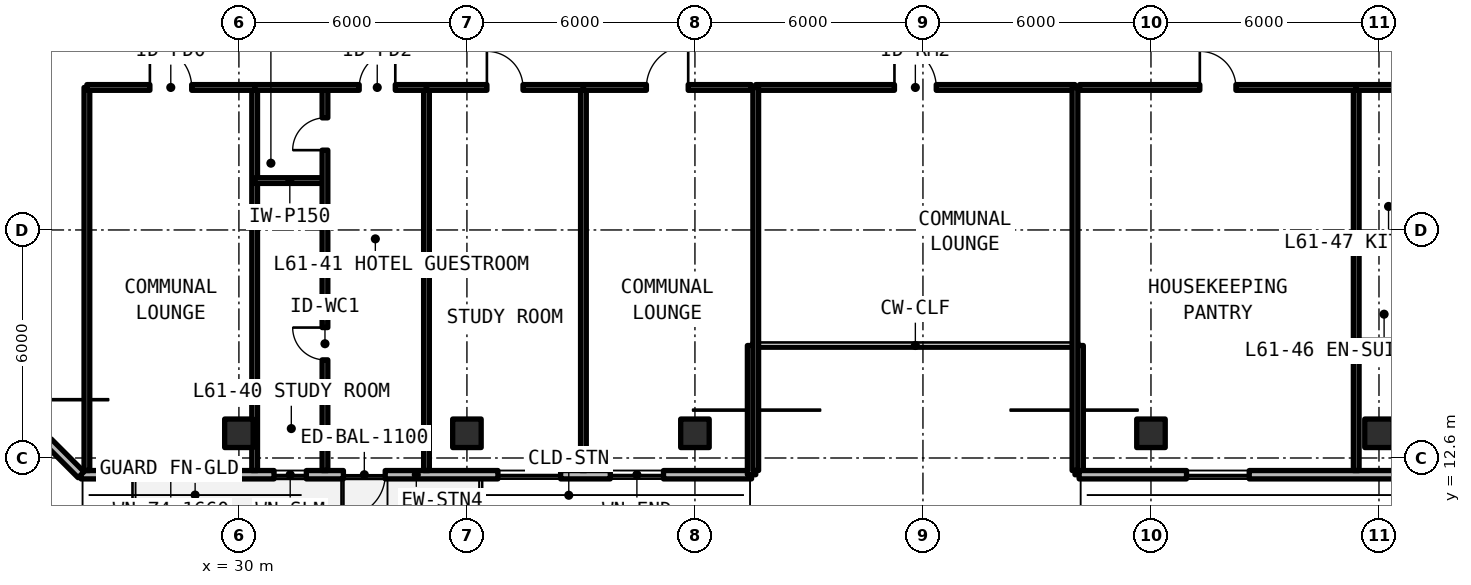
"""IFC4 building model, lengths in metres.
Left out: names, types, materials, properties, quantities, classifications, styles, units other than length and angle.
Written with IfcOpenShell. Run it as: python <this file> out.ifc"""

import sys

from ifc_helpers import new_model, si_unit, direction, frame, frame_2d, origin, origin_2d, place, context, subcontext, project, spatial, rectangle, extrude, element, fill, save


model = new_model("IFC4")
c1 = context("Model", 3, precision=1e-05, world=origin(), true_north=direction((0.0, 1.0)))
c2 = subcontext(c1, "Body", "Model", "MODEL_VIEW")
j1 = project(units=[si_unit("LENGTHUNIT", "METRE"), si_unit("PLANEANGLEUNIT", "RADIAN")], contexts=[c1])
p1 = place(None, origin())
s1 = spatial("IfcSite", under=j1, at=p1, CompositionType="ELEMENT")
p2 = place(p1, origin())
s2 = spatial("IfcBuilding", under=s1, at=p2, CompositionType="ELEMENT")
p3 = place(p2, frame((0.0, 0.0, 219.12)))
s3 = spatial("IfcBuildingStorey", under=s2, at=p3, CompositionType="ELEMENT", Elevation=219.12)
for number, where, z_axis, x_axis in (
    (1, (30.0, 13.25, 0.0), (0.0, 0.0, 1.0), (1.0, 0.0, 0.0)),
    (2, (36.0, 13.25, 0.0), (0.0, 0.0, 1.0), (1.0, 0.0, 0.0)),
    (3, (42.0, 13.25, 0.0), (0.0, 0.0, 1.0), (1.0, 0.0, 0.0)),
    (4, (54.0, 13.25, 0.0), (0.0, 0.0, 1.0), (1.0, 0.0, 0.0)),
    (5, (60.0, 13.25, 0.0), (0.0, 0.0, 1.0), (1.0, 0.0, 0.0)),
):
    element("IfcColumn", number, at=place(p3, frame(where, z_axis=z_axis, x_axis=x_axis)), inside=s3, PredefinedType="COLUMN", context=c2, shape_type="SweptSolid", body=[
        extrude(rectangle(XDim=0.75, YDim=0.75, at=origin_2d()), origin(), (0.0, 0.0, 1.0), 3.63),
    ])
p4 = place(p3, frame((25.846, 12.16, 0.0), z_axis=(0.0, 0.0, 1.0), x_axis=(1.0, 0.0, 0.0)))
e6 = element("IfcWall", 6, at=p4, inside=s3, PredefinedType="SOLIDWALL", context=c2, shape_type="SweptSolid", body=[
    extrude(rectangle(XDim=17.644, YDim=0.22, at=frame_2d((8.822, 0.0))), origin(), (0.0, 0.0, 1.0), 3.41),
])
p5 = place(p4, frame((6.904, 0.0, 0.0)))
e7 = element("IfcOpeningElement", 7, at=p5, cuts=e6, PredefinedType="OPENING", context=c2, shape_type="SweptSolid", body=[
    extrude(rectangle(XDim=1.1, YDim=2.15, at=frame_2d((0.55, 1.075))), frame((0.0, 0.12, 0.0), z_axis=(0.0, -1.0, 0.0), x_axis=(1.0, 0.0, 0.0)), (0.0, 0.0, 1.0), 0.24),
])
p6 = place(p4, frame((1.537, 0.0, 0.78)))
e8 = element("IfcOpeningElement", 8, at=p6, cuts=e6, PredefinedType="OPENING", context=c2, shape_type="SweptSolid", body=[
    extrude(rectangle(XDim=1.65, YDim=1.66, at=frame_2d((0.825, 0.83))), frame((0.0, 0.12, 0.0), z_axis=(0.0, -1.0, 0.0), x_axis=(1.0, 0.0, 0.0)), (0.0, 0.0, 1.0), 0.24),
])
p7 = place(p4, frame((5.079, 0.0, 0.78)))
e9 = element("IfcOpeningElement", 9, at=p7, cuts=e6, PredefinedType="OPENING", context=c2, shape_type="SweptSolid", body=[
    extrude(rectangle(XDim=0.85, YDim=1.65, at=frame_2d((0.425, 0.825))), frame((0.0, 0.12, 0.0), z_axis=(0.0, -1.0, 0.0), x_axis=(1.0, 0.0, 0.0)), (0.0, 0.0, 1.0), 0.24),
])
p8 = place(p4, frame((10.97, 0.0, 0.78)))
e10 = element("IfcOpeningElement", 10, at=p8, cuts=e6, PredefinedType="OPENING", context=c2, shape_type="SweptSolid", body=[
    extrude(rectangle(XDim=1.65, YDim=1.66, at=frame_2d((0.825, 0.83))), frame((0.0, 0.12, 0.0), z_axis=(0.0, -1.0, 0.0), x_axis=(1.0, 0.0, 0.0)), (0.0, 0.0, 1.0), 0.24),
])
p9 = place(p4, frame((13.927, 0.0, 0.78)))
e11 = element("IfcOpeningElement", 11, at=p9, cuts=e6, PredefinedType="OPENING", context=c2, shape_type="SweptSolid", body=[
    extrude(rectangle(XDim=1.4, YDim=1.65, at=frame_2d((0.7, 0.825))), frame((0.0, 0.12, 0.0), z_axis=(0.0, -1.0, 0.0), x_axis=(1.0, 0.0, 0.0)), (0.0, 0.0, 1.0), 0.24),
])
for number, where, z_axis, x_axis in (
    (12, (43.49, 12.16, 0.0), (0.0, 0.0, 1.0), (0.0, 1.0, 0.0)),
    (13, (52.11, 15.56, 0.0), (0.0, 0.0, 1.0), (0.0, -1.0, 0.0)),
):
    element("IfcWall", number, at=place(p3, frame(where, z_axis=z_axis, x_axis=x_axis)), inside=s3, PredefinedType="SOLIDWALL", context=c2, shape_type="SweptSolid", body=[
        extrude(rectangle(XDim=3.4, YDim=0.22, at=frame_2d((1.7, 0.0))), origin(), (0.0, 0.0, 1.0), 3.41),
    ])
p10 = place(p3, frame((52.11, 12.16, 0.0), z_axis=(0.0, 0.0, 1.0), x_axis=(1.0, 0.0, 0.0)))
e14 = element("IfcWall", 14, at=p10, inside=s3, PredefinedType="SOLIDWALL", context=c2, shape_type="SweptSolid", body=[
    extrude(rectangle(XDim=43.244, YDim=0.22, at=frame_2d((21.622, 0.0))), origin(), (0.0, 0.0, 1.0), 3.41),
])
p11 = place(p10, frame((16.69, 0.0, 0.0)))
e15 = element("IfcOpeningElement", 15, at=p11, cuts=e14, PredefinedType="OPENING", context=c2, shape_type="SweptSolid", body=[
    extrude(rectangle(XDim=1.1, YDim=2.15, at=frame_2d((0.55, 1.075))), frame((0.0, 0.12, 0.0), z_axis=(0.0, -1.0, 0.0), x_axis=(1.0, 0.0, 0.0)), (0.0, 0.0, 1.0), 0.24),
])
p12 = place(p10, frame((27.79, 0.0, 0.0)))
e16 = element("IfcOpeningElement", 16, at=p12, cuts=e14, PredefinedType="OPENING", context=c2, shape_type="SweptSolid", body=[
    extrude(rectangle(XDim=1.1, YDim=2.15, at=frame_2d((0.55, 1.075))), frame((0.0, 0.12, 0.0), z_axis=(0.0, -1.0, 0.0), x_axis=(1.0, 0.0, 0.0)), (0.0, 0.0, 1.0), 0.24),
])
p13 = place(p10, frame((2.826, 0.0, 0.78)))
e17 = element("IfcOpeningElement", 17, at=p13, cuts=e14, PredefinedType="OPENING", context=c2, shape_type="SweptSolid", body=[
    extrude(rectangle(XDim=1.65, YDim=1.66, at=frame_2d((0.825, 0.83))), frame((0.0, 0.12, 0.0), z_axis=(0.0, -1.0, 0.0), x_axis=(1.0, 0.0, 0.0)), (0.0, 0.0, 1.0), 0.24),
])
p14 = place(p10, frame((10.865, 0.0, 0.78)))
e18 = element("IfcOpeningElement", 18, at=p14, cuts=e14, PredefinedType="OPENING", context=c2, shape_type="SweptSolid", body=[
    extrude(rectangle(XDim=1.65, YDim=1.66, at=frame_2d((0.825, 0.83))), frame((0.0, 0.12, 0.0), z_axis=(0.0, -1.0, 0.0), x_axis=(1.0, 0.0, 0.0)), (0.0, 0.0, 1.0), 0.24),
])
p15 = place(p10, frame((38.666, 0.0, 0.78)))
e19 = element("IfcOpeningElement", 19, at=p15, cuts=e14, PredefinedType="OPENING", context=c2, shape_type="SweptSolid", body=[
    extrude(rectangle(XDim=1.65, YDim=1.66, at=frame_2d((0.825, 0.83))), frame((0.0, 0.12, 0.0), z_axis=(0.0, -1.0, 0.0), x_axis=(1.0, 0.0, 0.0)), (0.0, 0.0, 1.0), 0.24),
])
p16 = place(p3, frame((21.71, 16.296, 0.0), z_axis=(0.0, 0.0, 1.0), x_axis=(0.707106781187, -0.707106781187, 0.0)))
e20 = element("IfcWall", 20, at=p16, inside=s3, PredefinedType="SOLIDWALL", context=c2, shape_type="SweptSolid", body=[
    extrude(rectangle(XDim=5.849, YDim=0.22, at=frame_2d((2.924, 0.0))), origin(), (0.0, 0.0, 1.0), 3.41),
])
p17 = place(p16, frame((1.224, 0.0, 0.78)))
e21 = element("IfcOpeningElement", 21, at=p17, cuts=e20, PredefinedType="OPENING", context=c2, shape_type="SweptSolid", body=[
    extrude(rectangle(XDim=3.4, YDim=1.66, at=frame_2d((1.7, 0.83))), frame((0.0, 0.12, 0.0), z_axis=(0.0, -1.0, 0.0), x_axis=(1.0, 0.0, 0.0)), (0.0, 0.0, 1.0), 0.24),
])
p18 = place(p3, frame((43.6, 22.35, 0.0), z_axis=(0.0, 0.0, 1.0), x_axis=(1.0, 0.0, 0.0)))
e22 = element("IfcWall", 22, at=p18, inside=s3, PredefinedType="SOLIDWALL", context=c2, shape_type="SweptSolid", body=[
    extrude(rectangle(XDim=8.4, YDim=0.15, at=frame_2d((4.2, 0.0))), origin(), (0.0, 0.0, 1.0), 2.63),
])
p19 = place(p18, frame((3.65, 0.0, 0.0)))
e23 = element("IfcOpeningElement", 23, at=p19, cuts=e22, PredefinedType="OPENING", context=c2, shape_type="SweptSolid", body=[
    extrude(rectangle(XDim=1.1, YDim=2.15, at=frame_2d((0.55, 1.075))), frame((0.0, 0.085, 0.0), z_axis=(0.0, -1.0, 0.0), x_axis=(1.0, 0.0, 0.0)), (0.0, 0.0, 1.0), 0.17),
])
for number, where, z_axis, x_axis in (
    (24, (43.6, 12.27, 0.0), (0.0, 0.0, 1.0), (0.0, 1.0, 0.0)),
    (25, (52.0, 12.27, 0.0), (0.0, 0.0, 1.0), (0.0, 1.0, 0.0)),
    (26, (26.0, 12.27, 0.0), (0.0, 0.0, 1.0), (0.0, 1.0, 0.0)),
    (27, (30.415, 12.27, 0.0), (0.0, 0.0, 1.0), (0.0, 1.0, 0.0)),
):
    element("IfcWall", number, at=place(p3, frame(where, z_axis=z_axis, x_axis=x_axis)), inside=s3, PredefinedType="SOLIDWALL", context=c2, shape_type="SweptSolid", body=[
        extrude(rectangle(XDim=10.08, YDim=0.15, at=frame_2d((5.04, 0.0))), origin(), (0.0, 0.0, 1.0), 2.63),
    ])
p20 = place(p3, frame((26.0, 22.35, 0.0), z_axis=(0.0, 0.0, 1.0), x_axis=(1.0, 0.0, 0.0)))
e28 = element("IfcWall", 28, at=p20, inside=s3, PredefinedType="SOLIDWALL", context=c2, shape_type="SweptSolid", body=[
    extrude(rectangle(XDim=4.415, YDim=0.15, at=frame_2d((2.207, 0.0))), origin(), (0.0, 0.0, 1.0), 2.63),
])
p21 = place(p20, frame((1.657, 0.0, 0.0)))
e29 = element("IfcOpeningElement", 29, at=p21, cuts=e28, PredefinedType="OPENING", context=c2, shape_type="SweptSolid", body=[
    extrude(rectangle(XDim=1.1, YDim=2.15, at=frame_2d((0.55, 1.075))), frame((0.0, 0.085, 0.0), z_axis=(0.0, -1.0, 0.0), x_axis=(1.0, 0.0, 0.0)), (0.0, 0.0, 1.0), 0.17),
])
p22 = place(p3, frame((34.936, 12.27, 0.0), z_axis=(0.0, 0.0, 1.0), x_axis=(0.0, 1.0, 0.0)))
e30 = element("IfcWall", 30, at=p22, inside=s3, PredefinedType="SOLIDWALL", context=c2, shape_type="SweptSolid", body=[
    extrude(rectangle(XDim=10.08, YDim=0.15, at=frame_2d((5.04, 0.0))), origin(), (0.0, 0.0, 1.0), 2.63),
])
p23 = place(p3, frame((30.415, 19.9, 0.0), z_axis=(0.0, 0.0, 1.0), x_axis=(1.0, 0.0, 0.0)))
e31 = element("IfcWall", 31, at=p23, inside=s3, PredefinedType="PARTITIONING", context=c2, shape_type="SweptSolid", body=[
    extrude(rectangle(XDim=1.85, YDim=0.15, at=frame_2d((0.925, 0.0))), origin(), (0.0, 0.0, 1.0), 2.63),
])
p24 = place(p3, frame((32.264, 12.27, 0.0), z_axis=(0.0, 0.0, 1.0), x_axis=(0.0, 1.0, 0.0)))
e32 = element("IfcWall", 32, at=p24, inside=s3, PredefinedType="PARTITIONING", context=c2, shape_type="SweptSolid", body=[
    extrude(rectangle(XDim=10.08, YDim=0.15, at=frame_2d((5.04, 0.0))), origin(), (0.0, 0.0, 1.0), 2.63),
])
p25 = place(p24, frame((2.912, 0.0, 0.0)))
e33 = element("IfcOpeningElement", 33, at=p25, cuts=e32, PredefinedType="OPENING", context=c2, shape_type="SweptSolid", body=[
    extrude(rectangle(XDim=0.85, YDim=2.1, at=frame_2d((0.425, 1.05))), frame((0.0, 0.085, 0.0), z_axis=(0.0, -1.0, 0.0), x_axis=(1.0, 0.0, 0.0)), (0.0, 0.0, 1.0), 0.17),
])
p26 = place(p24, frame((8.43, 0.0, 0.0)))
e34 = element("IfcOpeningElement", 34, at=p26, cuts=e32, PredefinedType="OPENING", context=c2, shape_type="SweptSolid", body=[
    extrude(rectangle(XDim=0.85, YDim=2.1, at=frame_2d((0.425, 1.05))), frame((0.0, 0.085, 0.0), z_axis=(0.0, -1.0, 0.0), x_axis=(1.0, 0.0, 0.0)), (0.0, 0.0, 1.0), 0.17),
])
p27 = place(p3, frame((30.415, 22.35, 0.0), z_axis=(0.0, 0.0, 1.0), x_axis=(1.0, 0.0, 0.0)))
e35 = element("IfcWall", 35, at=p27, inside=s3, PredefinedType="SOLIDWALL", context=c2, shape_type="SweptSolid", body=[
    extrude(rectangle(XDim=4.521, YDim=0.15, at=frame_2d((2.261, 0.0))), origin(), (0.0, 0.0, 1.0), 2.63),
])
p28 = place(p27, frame((2.75, 0.0, 0.0)))
e36 = element("IfcOpeningElement", 36, at=p28, cuts=e35, PredefinedType="OPENING", context=c2, shape_type="SweptSolid", body=[
    extrude(rectangle(XDim=0.95, YDim=2.15, at=frame_2d((0.475, 1.075))), frame((0.0, 0.085, 0.0), z_axis=(0.0, -1.0, 0.0), x_axis=(1.0, 0.0, 0.0)), (0.0, 0.0, 1.0), 0.17),
])
p29 = place(p3, frame((39.065, 12.27, 0.0), z_axis=(0.0, 0.0, 1.0), x_axis=(0.0, 1.0, 0.0)))
e37 = element("IfcWall", 37, at=p29, inside=s3, PredefinedType="SOLIDWALL", context=c2, shape_type="SweptSolid", body=[
    extrude(rectangle(XDim=10.08, YDim=0.15, at=frame_2d((5.04, 0.0))), origin(), (0.0, 0.0, 1.0), 2.63),
])
p30 = place(p3, frame((34.936, 22.35, 0.0), z_axis=(0.0, 0.0, 1.0), x_axis=(1.0, 0.0, 0.0)))
e38 = element("IfcWall", 38, at=p30, inside=s3, PredefinedType="SOLIDWALL", context=c2, shape_type="SweptSolid", body=[
    extrude(rectangle(XDim=4.13, YDim=0.15, at=frame_2d((2.065, 0.0))), origin(), (0.0, 0.0, 1.0), 2.63),
])
p31 = place(p30, frame((1.59, 0.0, 0.0)))
e39 = element("IfcOpeningElement", 39, at=p31, cuts=e38, PredefinedType="OPENING", context=c2, shape_type="SweptSolid", body=[
    extrude(rectangle(XDim=0.95, YDim=2.15, at=frame_2d((0.475, 1.075))), frame((0.0, 0.085, 0.0), z_axis=(0.0, -1.0, 0.0), x_axis=(1.0, 0.0, 0.0)), (0.0, 0.0, 1.0), 0.17),
])
p32 = place(p3, frame((39.065, 22.35, 0.0), z_axis=(0.0, 0.0, 1.0), x_axis=(1.0, 0.0, 0.0)))
e40 = element("IfcWall", 40, at=p32, inside=s3, PredefinedType="SOLIDWALL", context=c2, shape_type="SweptSolid", body=[
    extrude(rectangle(XDim=4.415, YDim=0.15, at=frame_2d((2.207, 0.0))), origin(), (0.0, 0.0, 1.0), 2.63),
])
p33 = place(p32, frame((1.657, 0.0, 0.0)))
e41 = element("IfcOpeningElement", 41, at=p33, cuts=e40, PredefinedType="OPENING", context=c2, shape_type="SweptSolid", body=[
    extrude(rectangle(XDim=1.1, YDim=2.15, at=frame_2d((0.55, 1.075))), frame((0.0, 0.085, 0.0), z_axis=(0.0, -1.0, 0.0), x_axis=(1.0, 0.0, 0.0)), (0.0, 0.0, 1.0), 0.17),
])
p34 = place(p3, frame((59.401, 12.27, 0.0), z_axis=(0.0, 0.0, 1.0), x_axis=(0.0, 1.0, 0.0)))
e42 = element("IfcWall", 42, at=p34, inside=s3, PredefinedType="SOLIDWALL", context=c2, shape_type="SweptSolid", body=[
    extrude(rectangle(XDim=10.08, YDim=0.15, at=frame_2d((5.04, 0.0))), origin(), (0.0, 0.0, 1.0), 2.63),
])
p35 = place(p3, frame((52.12, 22.35, 0.0), z_axis=(0.0, 0.0, 1.0), x_axis=(1.0, 0.0, 0.0)))
e43 = element("IfcWall", 43, at=p35, inside=s3, PredefinedType="SOLIDWALL", context=c2, shape_type="SweptSolid", body=[
    extrude(rectangle(XDim=7.281, YDim=0.15, at=frame_2d((3.641, 0.0))), origin(), (0.0, 0.0, 1.0), 2.63),
])
p36 = place(p35, frame((3.166, 0.0, 0.0)))
e44 = element("IfcOpeningElement", 44, at=p36, cuts=e43, PredefinedType="OPENING", context=c2, shape_type="SweptSolid", body=[
    extrude(rectangle(XDim=0.95, YDim=2.15, at=frame_2d((0.475, 1.075))), frame((0.0, 0.085, 0.0), z_axis=(0.0, -1.0, 0.0), x_axis=(1.0, 0.0, 0.0)), (0.0, 0.0, 1.0), 0.17),
])
p37 = place(p3, frame((59.401, 18.381, 0.0), z_axis=(0.0, 0.0, 1.0), x_axis=(1.0, 0.0, 0.0)))
e45 = element("IfcWall", 45, at=p37, inside=s3, PredefinedType="PARTITIONING", context=c2, shape_type="SweptSolid", body=[
    extrude(rectangle(XDim=2.519, YDim=0.15, at=frame_2d((1.259, 0.0))), origin(), (0.0, 0.0, 1.0), 2.63),
])
p38 = place(p3, frame((59.401, 15.623, 0.0), z_axis=(0.0, 0.0, 1.0), x_axis=(1.0, 0.0, 0.0)))
e46 = element("IfcWall", 46, at=p38, inside=s3, PredefinedType="PARTITIONING", context=c2, shape_type="SweptSolid", body=[
    extrude(rectangle(XDim=8.798, YDim=0.15, at=frame_2d((4.399, 0.0))), origin(), (0.0, 0.0, 1.0), 2.63),
])
p39 = place(p38, frame((5.273, 0.0, 0.0)))
e47 = element("IfcOpeningElement", 47, at=p39, cuts=e46, PredefinedType="OPENING", context=c2, shape_type="SweptSolid", body=[
    extrude(rectangle(XDim=0.85, YDim=2.1, at=frame_2d((0.425, 1.05))), frame((0.0, 0.085, 0.0), z_axis=(0.0, -1.0, 0.0), x_axis=(1.0, 0.0, 0.0)), (0.0, 0.0, 1.0), 0.17),
])
p40 = place(p3, frame((59.401, 22.35, 0.0), z_axis=(0.0, 0.0, 1.0), x_axis=(1.0, 0.0, 0.0)))
e48 = element("IfcWall", 48, at=p40, inside=s3, PredefinedType="SOLIDWALL", context=c2, shape_type="SweptSolid", body=[
    extrude(rectangle(XDim=8.798, YDim=0.15, at=frame_2d((4.399, 0.0))), origin(), (0.0, 0.0, 1.0), 2.63),
])
p41 = place(p40, frame((5.223, 0.0, 0.0)))
e49 = element("IfcOpeningElement", 49, at=p41, cuts=e48, PredefinedType="OPENING", context=c2, shape_type="SweptSolid", body=[
    extrude(rectangle(XDim=0.95, YDim=2.15, at=frame_2d((0.475, 1.075))), frame((0.0, 0.085, 0.0), z_axis=(0.0, -1.0, 0.0), x_axis=(1.0, 0.0, 0.0)), (0.0, 0.0, 1.0), 0.17),
])
p42 = place(p5, frame((1.1, 0.0, 0.0), z_axis=(0.0, 0.0, 1.0), x_axis=(-1.0, 0.0, 0.0)))
e50 = element("IfcDoor", 50, at=p42, inside=s3, OperationType="SINGLE_SWING_LEFT", PredefinedType="DOOR", context=c2, shape_type="SweptSolid", body=[
    extrude(rectangle(XDim=1.1, YDim=2.15, at=frame_2d((0.55, 1.075))), frame((0.0, 0.025, 0.0), z_axis=(0.0, -1.0, 0.0), x_axis=(1.0, 0.0, 0.0)), (0.0, 0.0, 1.0), 0.05),
])
fill(e7, e50)
p43 = place(p6, origin())
e51 = element("IfcWindow", 51, at=p43, inside=s3, PartitioningType="SINGLE_PANEL", PredefinedType="WINDOW", context=c2, shape_type="SweptSolid", body=[
    extrude(rectangle(XDim=1.65, YDim=1.66, at=frame_2d((0.825, 0.83))), frame((0.0, 0.03, 0.0), z_axis=(0.0, -1.0, 0.0), x_axis=(1.0, 0.0, 0.0)), (0.0, 0.0, 1.0), 0.06),
])
fill(e8, e51)
p44 = place(p7, origin())
e52 = element("IfcWindow", 52, at=p44, inside=s3, PartitioningType="SINGLE_PANEL", PredefinedType="WINDOW", context=c2, shape_type="SweptSolid", body=[
    extrude(rectangle(XDim=0.85, YDim=1.65, at=frame_2d((0.425, 0.825))), frame((0.0, 0.03, 0.0), z_axis=(0.0, -1.0, 0.0), x_axis=(1.0, 0.0, 0.0)), (0.0, 0.0, 1.0), 0.06),
])
fill(e9, e52)
p45 = place(p8, origin())
e53 = element("IfcWindow", 53, at=p45, inside=s3, PartitioningType="SINGLE_PANEL", PredefinedType="WINDOW", context=c2, shape_type="SweptSolid", body=[
    extrude(rectangle(XDim=1.65, YDim=1.66, at=frame_2d((0.825, 0.83))), frame((0.0, 0.03, 0.0), z_axis=(0.0, -1.0, 0.0), x_axis=(1.0, 0.0, 0.0)), (0.0, 0.0, 1.0), 0.06),
])
fill(e10, e53)
p46 = place(p9, origin())
e54 = element("IfcWindow", 54, at=p46, inside=s3, PartitioningType="SINGLE_PANEL", PredefinedType="WINDOW", context=c2, shape_type="SweptSolid", body=[
    extrude(rectangle(XDim=1.4, YDim=1.65, at=frame_2d((0.7, 0.825))), frame((0.0, 0.03, 0.0), z_axis=(0.0, -1.0, 0.0), x_axis=(1.0, 0.0, 0.0)), (0.0, 0.0, 1.0), 0.06),
])
fill(e11, e54)
p47 = place(p13, origin())
e55 = element("IfcWindow", 55, at=p47, inside=s3, PartitioningType="SINGLE_PANEL", PredefinedType="WINDOW", context=c2, shape_type="SweptSolid", body=[
    extrude(rectangle(XDim=1.65, YDim=1.66, at=frame_2d((0.825, 0.83))), frame((0.0, 0.03, 0.0), z_axis=(0.0, -1.0, 0.0), x_axis=(1.0, 0.0, 0.0)), (0.0, 0.0, 1.0), 0.06),
])
fill(e17, e55)
p48 = place(p19, origin())
e56 = element("IfcDoor", 56, at=p48, inside=s3, OperationType="SINGLE_SWING_LEFT", PredefinedType="DOOR", context=c2, shape_type="SweptSolid", body=[
    extrude(rectangle(XDim=1.1, YDim=2.15, at=frame_2d((0.55, 1.075))), frame((0.0, 0.025, 0.0), z_axis=(0.0, -1.0, 0.0), x_axis=(1.0, 0.0, 0.0)), (0.0, 0.0, 1.0), 0.05),
])
fill(e23, e56)
p49 = place(p21, origin())
e57 = element("IfcDoor", 57, at=p49, inside=s3, OperationType="SINGLE_SWING_LEFT", PredefinedType="DOOR", context=c2, shape_type="SweptSolid", body=[
    extrude(rectangle(XDim=1.1, YDim=2.15, at=frame_2d((0.55, 1.075))), frame((0.0, 0.025, 0.0), z_axis=(0.0, -1.0, 0.0), x_axis=(1.0, 0.0, 0.0)), (0.0, 0.0, 1.0), 0.05),
])
fill(e29, e57)
p50 = place(p25, origin())
e58 = element("IfcDoor", 58, at=p50, inside=s3, OperationType="SINGLE_SWING_RIGHT", PredefinedType="DOOR", context=c2, shape_type="SweptSolid", body=[
    extrude(rectangle(XDim=0.85, YDim=2.1, at=frame_2d((0.425, 1.05))), frame((0.0, 0.025, 0.0), z_axis=(0.0, -1.0, 0.0), x_axis=(1.0, 0.0, 0.0)), (0.0, 0.0, 1.0), 0.05),
])
fill(e33, e58)
p51 = place(p26, origin())
e59 = element("IfcDoor", 59, at=p51, inside=s3, OperationType="SINGLE_SWING_LEFT", PredefinedType="DOOR", context=c2, shape_type="SweptSolid", body=[
    extrude(rectangle(XDim=0.85, YDim=2.1, at=frame_2d((0.425, 1.05))), frame((0.0, 0.025, 0.0), z_axis=(0.0, -1.0, 0.0), x_axis=(1.0, 0.0, 0.0)), (0.0, 0.0, 1.0), 0.05),
])
fill(e34, e59)
p52 = place(p28, origin())
e60 = element("IfcDoor", 60, at=p52, inside=s3, OperationType="SINGLE_SWING_RIGHT", PredefinedType="DOOR", context=c2, shape_type="SweptSolid", body=[
    extrude(rectangle(XDim=0.95, YDim=2.15, at=frame_2d((0.475, 1.075))), frame((0.0, 0.025, 0.0), z_axis=(0.0, -1.0, 0.0), x_axis=(1.0, 0.0, 0.0)), (0.0, 0.0, 1.0), 0.05),
])
fill(e36, e60)
p53 = place(p31, origin())
e61 = element("IfcDoor", 61, at=p53, inside=s3, OperationType="SINGLE_SWING_LEFT", PredefinedType="DOOR", context=c2, shape_type="SweptSolid", body=[
    extrude(rectangle(XDim=0.95, YDim=2.15, at=frame_2d((0.475, 1.075))), frame((0.0, 0.025, 0.0), z_axis=(0.0, -1.0, 0.0), x_axis=(1.0, 0.0, 0.0)), (0.0, 0.0, 1.0), 0.05),
])
fill(e39, e61)
p54 = place(p33, origin())
e62 = element("IfcDoor", 62, at=p54, inside=s3, OperationType="SINGLE_SWING_RIGHT", PredefinedType="DOOR", context=c2, shape_type="SweptSolid", body=[
    extrude(rectangle(XDim=1.1, YDim=2.15, at=frame_2d((0.55, 1.075))), frame((0.0, 0.025, 0.0), z_axis=(0.0, -1.0, 0.0), x_axis=(1.0, 0.0, 0.0)), (0.0, 0.0, 1.0), 0.05),
])
fill(e41, e62)
p55 = place(p36, origin())
e63 = element("IfcDoor", 63, at=p55, inside=s3, OperationType="SINGLE_SWING_LEFT", PredefinedType="DOOR", context=c2, shape_type="SweptSolid", body=[
    extrude(rectangle(XDim=0.95, YDim=2.15, at=frame_2d((0.475, 1.075))), frame((0.0, 0.025, 0.0), z_axis=(0.0, -1.0, 0.0), x_axis=(1.0, 0.0, 0.0)), (0.0, 0.0, 1.0), 0.05),
])
fill(e44, e63)
save(model, sys.argv[1])
